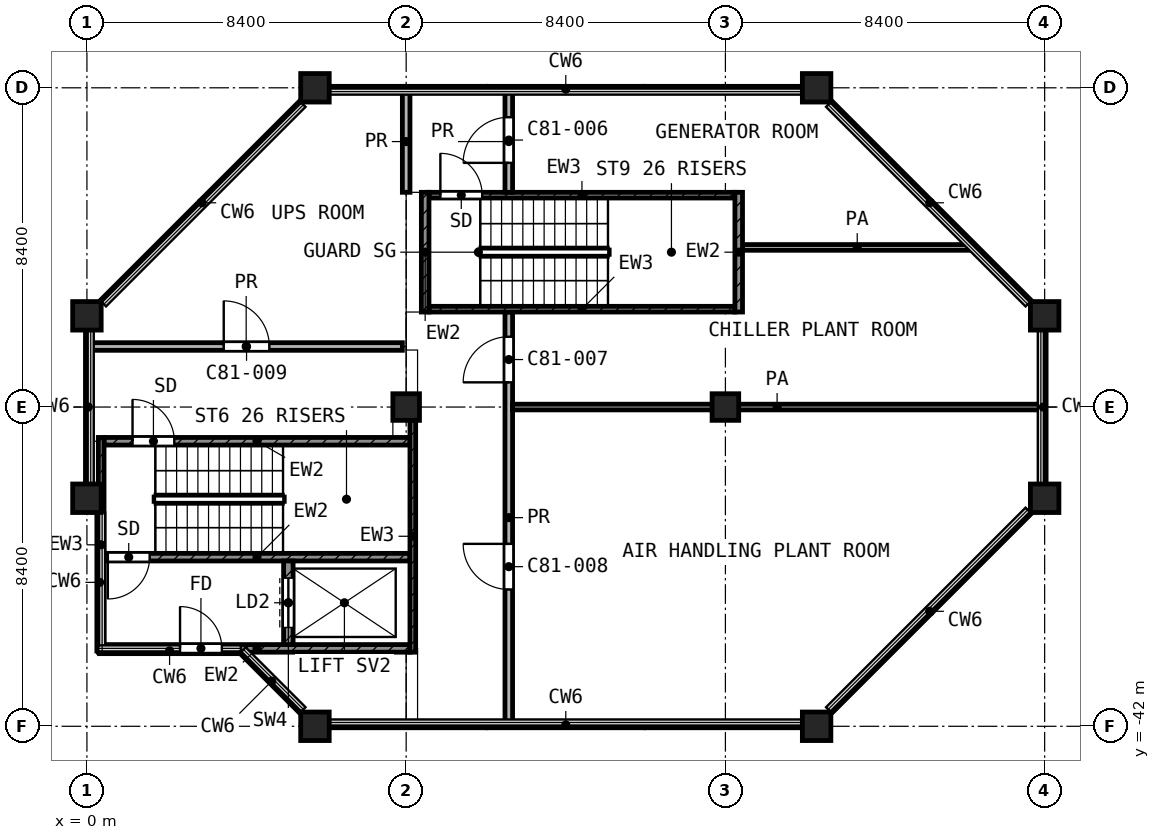
"""IFC4 building model, lengths in metres.
Left out: names, types, materials, properties, quantities, classifications, styles, units other than length and angle.
Written with IfcOpenShell. Run it as: python <this file> out.ifc"""

import sys

from ifc_helpers import new_model, si_unit, direction, frame, frame_2d, origin, origin_2d, place, context, subcontext, project, spatial, rectangle, extrude, element, fill, save


model = new_model("IFC4")
c1 = context("Model", 3, precision=1e-05, world=origin(), true_north=direction((0.0, 1.0)))
c2 = subcontext(c1, "Body", "Model", "MODEL_VIEW")
j1 = project(units=[si_unit("LENGTHUNIT", "METRE"), si_unit("PLANEANGLEUNIT", "RADIAN")], contexts=[c1])
p1 = place(None, origin())
s1 = spatial("IfcSite", under=j1, at=p1, CompositionType="ELEMENT")
p2 = place(p1, origin())
s2 = spatial("IfcBuilding", under=s1, at=p2, CompositionType="ELEMENT")
p3 = place(p2, frame((0.0, 0.0, 350.2)))
s3 = spatial("IfcBuildingStorey", under=s2, at=p3, CompositionType="ELEMENT", Elevation=350.2)
for number, where, z_axis, x_axis in (
    (1, (6.0, -25.2, 0.0), (0.0, 0.0, 1.0), (1.0, 0.0, 0.0)),
    (2, (19.2, -25.2, 0.0), (0.0, 0.0, 1.0), (1.0, 0.0, 0.0)),
    (3, (0.0, -31.2, 0.0), (0.0, 0.0, 1.0), (1.0, 0.0, 0.0)),
    (4, (25.2, -31.2, 0.0), (0.0, 0.0, 1.0), (1.0, 0.0, 0.0)),
):
    element("IfcColumn", number, at=place(p3, frame(where, z_axis=z_axis, x_axis=x_axis)), inside=s3, PredefinedType="COLUMN", context=c2, shape_type="SweptSolid", body=[
        extrude(rectangle(XDim=0.75, YDim=0.75, at=origin_2d()), origin(), (0.0, 0.0, 1.0), 4.5),
    ])
for number, where, z_axis, x_axis in (
    (5, (8.4, -33.6, 0.0), (0.0, 0.0, 1.0), (1.0, 0.0, 0.0)),
    (6, (16.8, -33.6, 0.0), (0.0, 0.0, 1.0), (1.0, 0.0, 0.0)),
):
    element("IfcColumn", number, at=place(p3, frame(where, z_axis=z_axis, x_axis=x_axis)), inside=s3, PredefinedType="COLUMN", context=c2, shape_type="SweptSolid", body=[
        extrude(rectangle(XDim=0.7, YDim=0.7, at=origin_2d()), origin(), (0.0, 0.0, 1.0), 4.5),
    ])
for number, where, z_axis, x_axis in (
    (7, (0.0, -36.0, 0.0), (0.0, 0.0, 1.0), (1.0, 0.0, 0.0)),
    (8, (25.2, -36.0, 0.0), (0.0, 0.0, 1.0), (1.0, 0.0, 0.0)),
    (9, (6.0, -42.0, 0.0), (0.0, 0.0, 1.0), (1.0, 0.0, 0.0)),
    (10, (19.2, -42.0, 0.0), (0.0, 0.0, 1.0), (1.0, 0.0, 0.0)),
):
    element("IfcColumn", number, at=place(p3, frame(where, z_axis=z_axis, x_axis=x_axis)), inside=s3, PredefinedType="COLUMN", context=c2, shape_type="SweptSolid", body=[
        extrude(rectangle(XDim=0.75, YDim=0.75, at=origin_2d()), origin(), (0.0, 0.0, 1.0), 4.5),
    ])
p4 = place(p3, frame((0.375, -40.05, 0.0), z_axis=(0.0, 0.0, 1.0), x_axis=(0.0, 1.0, 0.0)))
e11 = element("IfcWall", 11, at=p4, inside=s3, PredefinedType="SHEAR", context=c2, shape_type="SweptSolid", body=[
    extrude(rectangle(XDim=5.65, YDim=0.15, at=frame_2d((2.825, 0.0))), origin(), (0.0, 0.0, 1.0), 4.2),
])
p5 = place(p3, frame((8.575, -40.05, 0.0), z_axis=(0.0, 0.0, 1.0), x_axis=(0.0, 1.0, 0.0)))
e12 = element("IfcWall", 12, at=p5, inside=s3, PredefinedType="SHEAR", context=c2, shape_type="SweptSolid", body=[
    extrude(rectangle(XDim=6.1, YDim=0.15, at=frame_2d((3.05, 0.0))), origin(), (0.0, 0.0, 1.0), 4.2),
])
p6 = place(p3, frame((0.45, -34.5, 0.0), z_axis=(0.0, 0.0, 1.0), x_axis=(1.0, 0.0, 0.0)))
e13 = element("IfcWall", 13, at=p6, inside=s3, PredefinedType="SHEAR", context=c2, shape_type="SweptSolid", body=[
    extrude(rectangle(XDim=8.05, YDim=0.2, at=frame_2d((4.025, 0.0))), origin(), (0.0, 0.0, 1.0), 4.2),
])
p7 = place(p6, frame((0.75, 0.0, 0.0)))
e14 = element("IfcOpeningElement", 14, at=p7, cuts=e13, PredefinedType="OPENING", context=c2, shape_type="SweptSolid", body=[
    extrude(rectangle(XDim=1.1, YDim=2.1, at=frame_2d((0.55, 1.05))), frame((0.0, 0.11, 0.0), z_axis=(0.0, -1.0, 0.0), x_axis=(1.0, 0.0, 0.0)), (0.0, 0.0, 1.0), 0.22),
])
p8 = place(p3, frame((0.45, -37.55, 0.0), z_axis=(0.0, 0.0, 1.0), x_axis=(1.0, 0.0, 0.0)))
e15 = element("IfcWall", 15, at=p8, inside=s3, PredefinedType="SHEAR", context=c2, shape_type="SweptSolid", body=[
    extrude(rectangle(XDim=8.05, YDim=0.2, at=frame_2d((4.025, 0.0))), origin(), (0.0, 0.0, 1.0), 4.2),
])
p9 = place(p8, frame((0.1, 0.0, 0.0)))
e16 = element("IfcOpeningElement", 16, at=p9, cuts=e15, PredefinedType="OPENING", context=c2, shape_type="SweptSolid", body=[
    extrude(rectangle(XDim=1.1, YDim=2.1, at=frame_2d((0.55, 1.05))), frame((0.0, 0.11, 0.0), z_axis=(0.0, -1.0, 0.0), x_axis=(1.0, 0.0, 0.0)), (0.0, 0.0, 1.0), 0.22),
])
p10 = place(p3, frame((0.45, -39.95, 0.0), z_axis=(0.0, 0.0, 1.0), x_axis=(1.0, 0.0, 0.0)))
e17 = element("IfcWall", 17, at=p10, inside=s3, PredefinedType="SHEAR", context=c2, shape_type="SweptSolid", body=[
    extrude(rectangle(XDim=8.05, YDim=0.2, at=frame_2d((4.025, 0.0))), origin(), (0.0, 0.0, 1.0), 4.2),
])
p11 = place(p10, frame((2.0, 0.0, 0.0)))
e18 = element("IfcOpeningElement", 18, at=p11, cuts=e17, PredefinedType="OPENING", context=c2, shape_type="SweptSolid", body=[
    extrude(rectangle(XDim=1.1, YDim=2.1, at=frame_2d((0.55, 1.05))), frame((0.0, 0.11, 0.0), z_axis=(0.0, -1.0, 0.0), x_axis=(1.0, 0.0, 0.0)), (0.0, 0.0, 1.0), 0.22),
])
p12 = place(p3, frame((5.3, -39.85, 0.0), z_axis=(0.0, 0.0, 1.0), x_axis=(0.0, 1.0, 0.0)))
e19 = element("IfcWall", 19, at=p12, inside=s3, PredefinedType="SHEAR", context=c2, shape_type="SweptSolid", body=[
    extrude(rectangle(XDim=2.2, YDim=0.25, at=frame_2d((1.1, 0.0))), origin(), (0.0, 0.0, 1.0), 4.2),
])
p13 = place(p12, frame((0.45, 0.0, 0.0)))
e20 = element("IfcOpeningElement", 20, at=p13, cuts=e19, PredefinedType="OPENING", context=c2, shape_type="SweptSolid", body=[
    extrude(rectangle(XDim=1.3, YDim=2.1, at=frame_2d((0.65, 1.05))), frame((0.0, 0.135, 0.0), z_axis=(0.0, -1.0, 0.0), x_axis=(1.0, 0.0, 0.0)), (0.0, 0.0, 1.0), 0.27),
])
for number, where, z_axis, x_axis in (
    (21, (8.9, -31.1, 0.0), (0.0, 0.0, 1.0), (0.0, 1.0, 0.0)),
    (22, (17.15, -31.1, 0.0), (0.0, 0.0, 1.0), (0.0, 1.0, 0.0)),
):
    element("IfcWall", number, at=place(p3, frame(where, z_axis=z_axis, x_axis=x_axis)), inside=s3, PredefinedType="SHEAR", context=c2, shape_type="SweptSolid", body=[
        extrude(rectangle(XDim=3.15, YDim=0.2, at=frame_2d((1.575, 0.0))), origin(), (0.0, 0.0, 1.0), 4.2),
    ])
p14 = place(p3, frame((9.0, -28.025, 0.0), z_axis=(0.0, 0.0, 1.0), x_axis=(1.0, 0.0, 0.0)))
e23 = element("IfcWall", 23, at=p14, inside=s3, PredefinedType="SHEAR", context=c2, shape_type="SweptSolid", body=[
    extrude(rectangle(XDim=8.05, YDim=0.15, at=frame_2d((4.025, 0.0))), origin(), (0.0, 0.0, 1.0), 4.2),
])
p15 = place(p14, frame((0.3, 0.0, 0.0)))
e24 = element("IfcOpeningElement", 24, at=p15, cuts=e23, PredefinedType="OPENING", context=c2, shape_type="SweptSolid", body=[
    extrude(rectangle(XDim=1.1, YDim=2.1, at=frame_2d((0.55, 1.05))), frame((0.0, 0.085, 0.0), z_axis=(0.0, -1.0, 0.0), x_axis=(1.0, 0.0, 0.0)), (0.0, 0.0, 1.0), 0.17),
])
p16 = place(p3, frame((9.0, -31.025, 0.0), z_axis=(0.0, 0.0, 1.0), x_axis=(1.0, 0.0, 0.0)))
e25 = element("IfcWall", 25, at=p16, inside=s3, PredefinedType="SHEAR", context=c2, shape_type="SweptSolid", body=[
    extrude(rectangle(XDim=8.05, YDim=0.15, at=frame_2d((4.025, 0.0))), origin(), (0.0, 0.0, 1.0), 4.2),
])
p17 = place(p3, frame((11.2, -33.6, 0.0), z_axis=(0.0, 0.0, 1.0), x_axis=(1.0, 0.0, 0.0)))
e26 = element("IfcWall", 26, at=p17, inside=s3, PredefinedType="PARTITIONING", context=c2, shape_type="SweptSolid", body=[
    extrude(rectangle(XDim=13.92, YDim=0.15, at=frame_2d((6.96, 0.0))), origin(), (0.0, 0.0, 1.0), 4.2),
])
p18 = place(p3, frame((17.25, -29.4, 0.0), z_axis=(0.0, 0.0, 1.0), x_axis=(1.0, 0.0, 0.0)))
e27 = element("IfcWall", 27, at=p18, inside=s3, PredefinedType="PARTITIONING", context=c2, shape_type="SweptSolid", body=[
    extrude(rectangle(XDim=6.037, YDim=0.15, at=frame_2d((3.019, 0.0))), origin(), (0.0, 0.0, 1.0), 4.2),
])
p19 = place(p3, frame((0.08, -32.007, 0.0), z_axis=(0.0, 0.0, 1.0), x_axis=(1.0, 0.0, 0.0)))
e28 = element("IfcWall", 28, at=p19, inside=s3, PredefinedType="PARTITIONING", context=c2, shape_type="SweptSolid", body=[
    extrude(rectangle(XDim=8.22, YDim=0.2, at=frame_2d((4.11, 0.0))), origin(), (0.0, 0.0, 1.0), 4.2),
])
p20 = place(p19, frame((3.52, 0.0, 0.0)))
e29 = element("IfcOpeningElement", 29, at=p20, cuts=e28, PredefinedType="OPENING", context=c2, shape_type="SweptSolid", body=[
    extrude(rectangle(XDim=1.2, YDim=2.1, at=frame_2d((0.6, 1.05))), frame((0.0, 0.11, 0.0), z_axis=(0.0, -1.0, 0.0), x_axis=(1.0, 0.0, 0.0)), (0.0, 0.0, 1.0), 0.22),
])
p21 = place(p3, frame((8.4, -27.95, 0.0), z_axis=(0.0, 0.0, 1.0), x_axis=(0.0, 1.0, 0.0)))
e30 = element("IfcWall", 30, at=p21, inside=s3, PredefinedType="PARTITIONING", context=c2, shape_type="SweptSolid", body=[
    extrude(rectangle(XDim=2.67, YDim=0.2, at=frame_2d((1.335, 0.0))), origin(), (0.0, 0.0, 1.0), 4.2),
])
p22 = place(p3, frame((11.1, -41.92, 0.0), z_axis=(0.0, 0.0, 1.0), x_axis=(0.0, 1.0, 0.0)))
e31 = element("IfcWall", 31, at=p22, inside=s3, PredefinedType="PARTITIONING", context=c2, shape_type="SweptSolid", body=[
    extrude(rectangle(XDim=10.82, YDim=0.2, at=frame_2d((5.41, 0.0))), origin(), (0.0, 0.0, 1.0), 4.2),
])
p23 = place(p22, frame((8.97, 0.0, 0.0)))
e32 = element("IfcOpeningElement", 32, at=p23, cuts=e31, PredefinedType="OPENING", context=c2, shape_type="SweptSolid", body=[
    extrude(rectangle(XDim=1.2, YDim=2.1, at=frame_2d((0.6, 1.05))), frame((0.0, 0.11, 0.0), z_axis=(0.0, -1.0, 0.0), x_axis=(1.0, 0.0, 0.0)), (0.0, 0.0, 1.0), 0.22),
])
p24 = place(p22, frame((3.52, 0.0, 0.0)))
e33 = element("IfcOpeningElement", 33, at=p24, cuts=e31, PredefinedType="OPENING", context=c2, shape_type="SweptSolid", body=[
    extrude(rectangle(XDim=1.2, YDim=2.1, at=frame_2d((0.6, 1.05))), frame((0.0, 0.11, 0.0), z_axis=(0.0, -1.0, 0.0), x_axis=(1.0, 0.0, 0.0)), (0.0, 0.0, 1.0), 0.22),
])
p25 = place(p3, frame((11.1, -27.95, 0.0), z_axis=(0.0, 0.0, 1.0), x_axis=(0.0, 1.0, 0.0)))
e34 = element("IfcWall", 34, at=p25, inside=s3, PredefinedType="PARTITIONING", context=c2, shape_type="SweptSolid", body=[
    extrude(rectangle(XDim=2.67, YDim=0.2, at=frame_2d((1.335, 0.0))), origin(), (0.0, 0.0, 1.0), 4.2),
])
p26 = place(p25, frame((0.775, 0.0, 0.0)))
e35 = element("IfcOpeningElement", 35, at=p26, cuts=e34, PredefinedType="OPENING", context=c2, shape_type="SweptSolid", body=[
    extrude(rectangle(XDim=1.2, YDim=2.1, at=frame_2d((0.6, 1.05))), frame((0.0, 0.11, 0.0), z_axis=(0.0, -1.0, 0.0), x_axis=(1.0, 0.0, 0.0)), (0.0, 0.0, 1.0), 0.22),
])
p27 = place(p7, origin())
e36 = element("IfcDoor", 36, at=p27, inside=s3, OperationType="SINGLE_SWING_LEFT", PredefinedType="DOOR", context=c2, shape_type="SweptSolid", body=[
    extrude(rectangle(XDim=1.1, YDim=2.1, at=frame_2d((0.55, 1.05))), frame((0.0, 0.025, 0.0), z_axis=(0.0, -1.0, 0.0), x_axis=(1.0, 0.0, 0.0)), (0.0, 0.0, 1.0), 0.05),
])
fill(e14, e36)
p28 = place(p9, frame((1.1, 0.0, 0.0), z_axis=(0.0, 0.0, 1.0), x_axis=(-1.0, 0.0, 0.0)))
e37 = element("IfcDoor", 37, at=p28, inside=s3, OperationType="SINGLE_SWING_LEFT", PredefinedType="DOOR", context=c2, shape_type="SweptSolid", body=[
    extrude(rectangle(XDim=1.1, YDim=2.1, at=frame_2d((0.55, 1.05))), frame((0.0, 0.025, 0.0), z_axis=(0.0, -1.0, 0.0), x_axis=(1.0, 0.0, 0.0)), (0.0, 0.0, 1.0), 0.05),
])
fill(e16, e37)
p29 = place(p13, origin())
e38 = element("IfcDoor", 38, at=p29, inside=s3, OperationType="DOUBLE_DOOR_SLIDING", PredefinedType="DOOR", context=c2, shape_type="SweptSolid", body=[
    extrude(rectangle(XDim=1.3, YDim=2.1, at=frame_2d((0.65, 1.05))), frame((0.0, 0.025, 0.0), z_axis=(0.0, -1.0, 0.0), x_axis=(1.0, 0.0, 0.0)), (0.0, 0.0, 1.0), 0.05),
])
fill(e20, e38)
p30 = place(p11, origin())
e39 = element("IfcDoor", 39, at=p30, inside=s3, OperationType="SINGLE_SWING_LEFT", PredefinedType="DOOR", context=c2, shape_type="SweptSolid", body=[
    extrude(rectangle(XDim=1.1, YDim=2.1, at=frame_2d((0.55, 1.05))), frame((0.0, 0.025, 0.0), z_axis=(0.0, -1.0, 0.0), x_axis=(1.0, 0.0, 0.0)), (0.0, 0.0, 1.0), 0.05),
])
fill(e18, e39)
p31 = place(p15, origin())
e40 = element("IfcDoor", 40, at=p31, inside=s3, OperationType="SINGLE_SWING_LEFT", PredefinedType="DOOR", context=c2, shape_type="SweptSolid", body=[
    extrude(rectangle(XDim=1.1, YDim=2.1, at=frame_2d((0.55, 1.05))), frame((0.0, 0.025, 0.0), z_axis=(0.0, -1.0, 0.0), x_axis=(1.0, 0.0, 0.0)), (0.0, 0.0, 1.0), 0.05),
])
fill(e24, e40)
p32 = place(p26, origin())
e41 = element("IfcDoor", 41, at=p32, inside=s3, OperationType="SINGLE_SWING_LEFT", PredefinedType="DOOR", context=c2, shape_type="SweptSolid", body=[
    extrude(rectangle(XDim=1.2, YDim=2.1, at=frame_2d((0.6, 1.05))), frame((0.0, 0.025, 0.0), z_axis=(0.0, -1.0, 0.0), x_axis=(1.0, 0.0, 0.0)), (0.0, 0.0, 1.0), 0.05),
])
fill(e35, e41)
p33 = place(p23, origin())
e42 = element("IfcDoor", 42, at=p33, inside=s3, OperationType="SINGLE_SWING_LEFT", PredefinedType="DOOR", context=c2, shape_type="SweptSolid", body=[
    extrude(rectangle(XDim=1.2, YDim=2.1, at=frame_2d((0.6, 1.05))), frame((0.0, 0.025, 0.0), z_axis=(0.0, -1.0, 0.0), x_axis=(1.0, 0.0, 0.0)), (0.0, 0.0, 1.0), 0.05),
])
fill(e32, e42)
p34 = place(p24, origin())
e43 = element("IfcDoor", 43, at=p34, inside=s3, OperationType="SINGLE_SWING_RIGHT", PredefinedType="DOOR", context=c2, shape_type="SweptSolid", body=[
    extrude(rectangle(XDim=1.2, YDim=2.1, at=frame_2d((0.6, 1.05))), frame((0.0, 0.025, 0.0), z_axis=(0.0, -1.0, 0.0), x_axis=(1.0, 0.0, 0.0)), (0.0, 0.0, 1.0), 0.05),
])
fill(e33, e43)
p35 = place(p20, origin())
e44 = element("IfcDoor", 44, at=p35, inside=s3, OperationType="SINGLE_SWING_LEFT", PredefinedType="DOOR", context=c2, shape_type="SweptSolid", body=[
    extrude(rectangle(XDim=1.2, YDim=2.1, at=frame_2d((0.6, 1.05))), frame((0.0, 0.025, 0.0), z_axis=(0.0, -1.0, 0.0), x_axis=(1.0, 0.0, 0.0)), (0.0, 0.0, 1.0), 0.05),
])
fill(e29, e44)
save(model, sys.argv[1])
